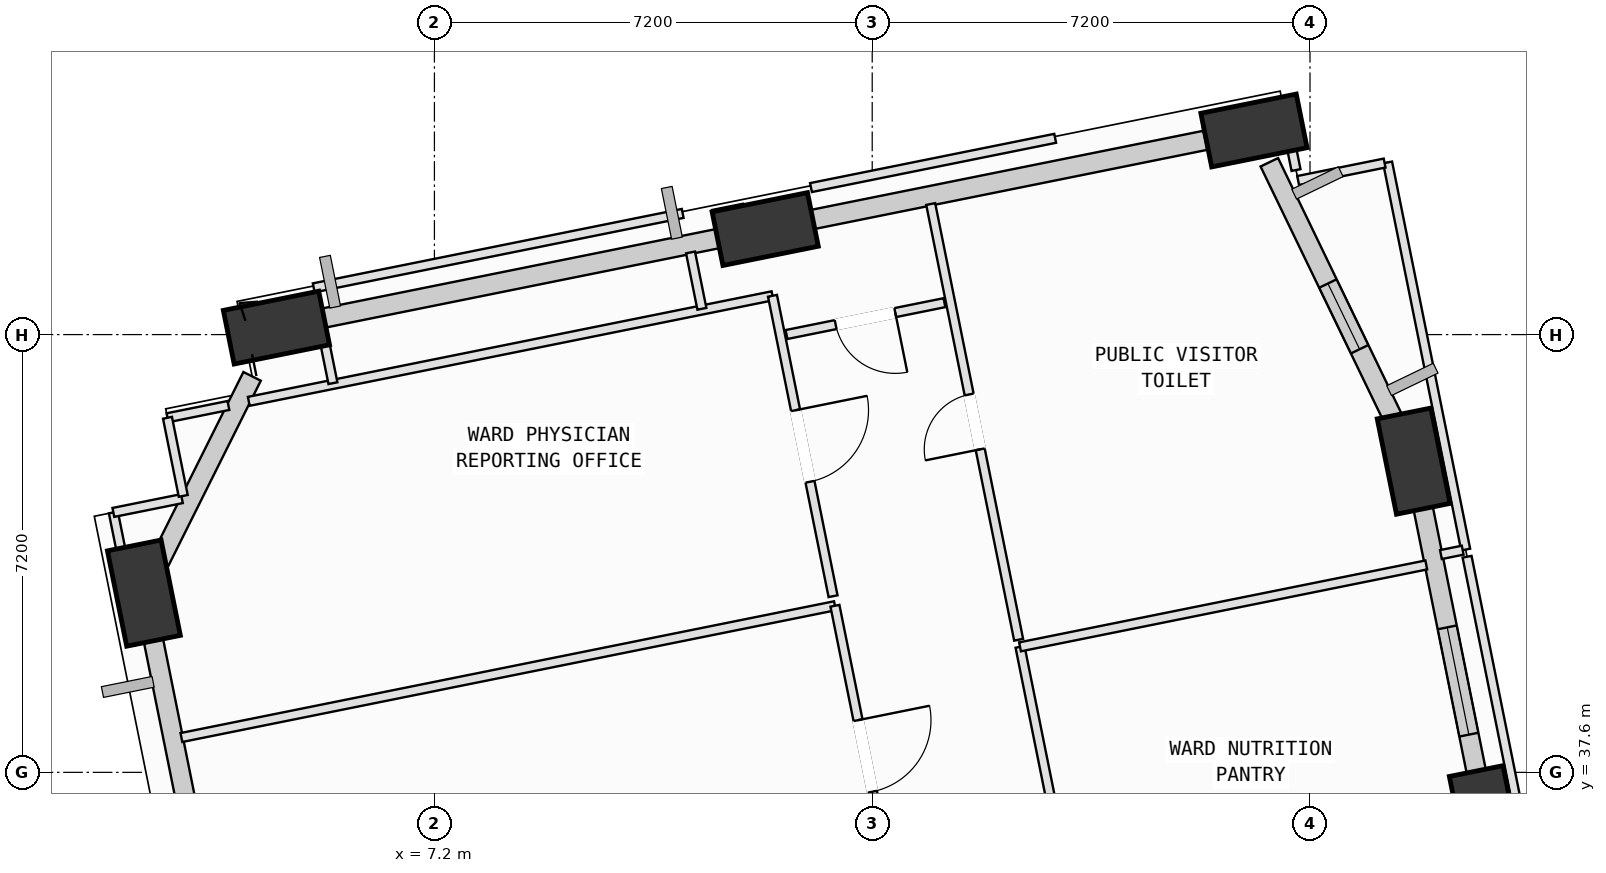
"""IFC4 building model, lengths in metres.
Left out: names, types, materials, properties, quantities, classifications, styles, units other than length and angle.
Written with IfcOpenShell. Run it as: python <this file> out.ifc"""

import sys

from ifc_helpers import new_model, si_unit, direction, frame, frame_2d, origin, origin_2d, place, context, subcontext, project, spatial, rectangle, extrude, element, fill, save


model = new_model("IFC4")
c1 = context("Model", 3, precision=1e-05, world=origin(), true_north=direction((0.0, 1.0)))
c2 = subcontext(c1, "Body", "Model", "MODEL_VIEW")
j1 = project(units=[si_unit("LENGTHUNIT", "METRE"), si_unit("PLANEANGLEUNIT", "RADIAN")], contexts=[c1])
p1 = place(None, origin())
s1 = spatial("IfcSite", under=j1, at=p1, CompositionType="ELEMENT")
p2 = place(p1, origin())
s2 = spatial("IfcBuilding", under=s1, at=p2, CompositionType="ELEMENT")
p3 = place(p2, frame((0.0, 0.0, 71.0)))
s3 = spatial("IfcBuildingStorey", under=s2, at=p3, CompositionType="ELEMENT", Elevation=71.0)
p4 = place(p3, frame((24.491, 36.837, 0.002), z_axis=(-0.04944522251, -0.038105134487, 0.998049682479), x_axis=(0.654284243965, 0.753768890214, 0.061193040821)))
e1 = element("IfcColumn", 1, at=p4, inside=s3, PredefinedType="COLUMN", context=c2, shape_type="SweptSolid", body=[
    extrude(rectangle(XDim=1.6, YDim=0.9, at=origin_2d()), origin(), (0.0, 0.0, 1.0), 4.004),
])
p5 = place(p3, frame((23.305, 42.719, 0.002), z_axis=(-0.07364612951, -0.043092115449, 0.996353008323), x_axis=(0.743170140005, 0.663853828041, 0.083643517389)))
e2 = element("IfcColumn", 2, at=p5, inside=s3, PredefinedType="COLUMN", context=c2, shape_type="SweptSolid", body=[
    extrude(rectangle(XDim=1.6, YDim=0.9, at=origin_2d()), origin(), (0.0, 0.0, 1.0), 4.011),
])
p6 = place(p3, frame((20.678, 48.157, 0.002), z_axis=(-0.095750725554, -0.054038139343, 0.993937461842), x_axis=(0.652889004976, -0.75714178031, 0.021731812851)))
e3 = element("IfcColumn", 3, at=p6, inside=s3, PredefinedType="COLUMN", context=c2, shape_type="SweptSolid", body=[
    extrude(rectangle(XDim=1.6, YDim=0.9, at=origin_2d()), origin(), (0.0, 0.0, 1.0), 4.021),
])
p7 = place(p3, frame((12.64, 46.536, 0.002), z_axis=(-0.088678638847, -0.086981440017, 0.992255172879), x_axis=(0.826442975623, -0.562484839864, 0.024552249733)))
e4 = element("IfcColumn", 4, at=p7, inside=s3, PredefinedType="COLUMN", context=c2, shape_type="SweptSolid", body=[
    extrude(rectangle(XDim=1.6, YDim=0.9, at=origin_2d()), origin(), (0.0, 0.0, 1.0), 4.028),
])
p8 = place(p3, frame((4.602, 44.915, 0.002), z_axis=(-0.081478721698, -0.119618983858, 0.989470826559), x_axis=(0.92027968951, -0.390213925825, 0.028607432025)))
e5 = element("IfcColumn", 5, at=p8, inside=s3, PredefinedType="COLUMN", context=c2, shape_type="SweptSolid", body=[
    extrude(rectangle(XDim=1.6, YDim=0.9, at=origin_2d()), origin(), (0.0, 0.0, 1.0), 4.039),
])
p9 = place(p3, frame((2.422, 40.548, 0.002), z_axis=(-0.063540455362, -0.128410967829, 0.989683400828), x_axis=(0.253106021414, 0.957189910208, 0.140445070115)))
e6 = element("IfcColumn", 6, at=p9, inside=s3, PredefinedType="COLUMN", context=c2, shape_type="SweptSolid", body=[
    extrude(rectangle(XDim=1.6, YDim=0.9, at=origin_2d()), origin(), (0.0, 0.0, 1.0), 4.038),
])
p10 = place(p3, frame((24.384, 37.368, 0.0), z_axis=(0.0, 0.0, 1.0), x_axis=(-0.197636570542, 0.980275362327, 0.0)))
e7 = element("IfcWall", 7, at=p10, inside=s3, PredefinedType="SOLIDWALL", context=c2, shape_type="SweptSolid", body=[
    extrude(rectangle(XDim=4.816, YDim=0.32, at=frame_2d((2.408, 0.0))), origin(), (0.0, 0.0, 1.0), 3.165),
])
p11 = place(p10, frame((0.869, 0.0, 0.75)))
e8 = element("IfcOpeningElement", 8, at=p11, cuts=e7, PredefinedType="OPENING", context=c2, shape_type="SweptSolid", body=[
    extrude(rectangle(XDim=1.8, YDim=2.05, at=frame_2d((0.9, 1.025))), frame((0.0, 0.17, 0.0), z_axis=(0.0, -1.0, 0.0), x_axis=(1.0, 0.0, 0.0)), (0.0, 0.0, 1.0), 0.34),
])
p12 = place(p3, frame((20.931, 47.634, 0.0), z_axis=(0.0, 0.0, 1.0), x_axis=(0.434947356849, -0.900455882745, 0.0)))
e9 = element("IfcWall", 9, at=p12, inside=s3, PredefinedType="SOLIDWALL", context=c2, shape_type="SweptSolid", body=[
    extrude(rectangle(XDim=4.889, YDim=0.32, at=frame_2d((2.444, 0.0))), origin(), (0.0, 0.0, 1.0), 3.165),
])
p13 = place(p12, frame((2.215, 0.0, 0.75)))
e10 = element("IfcOpeningElement", 10, at=p13, cuts=e9, PredefinedType="OPENING", context=c2, shape_type="SweptSolid", body=[
    extrude(rectangle(XDim=1.2, YDim=1.75, at=frame_2d((0.6, 0.875))), frame((0.0, 0.17, 0.0), z_axis=(0.0, -1.0, 0.0), x_axis=(1.0, 0.0, 0.0)), (0.0, 0.0, 1.0), 0.34),
])
p14 = place(p3, frame((13.015, 46.612, 0.0), z_axis=(0.0, 0.0, 1.0), x_axis=(0.98026972201, 0.197664544393, 0.0)))
e11 = element("IfcWall", 11, at=p14, inside=s3, PredefinedType="SOLIDWALL", context=c2, shape_type="SweptSolid", body=[
    extrude(rectangle(XDim=7.003, YDim=0.32, at=frame_2d((3.501, 0.0))), origin(), (0.0, 0.0, 1.0), 3.165),
])
p15 = place(p3, frame((4.958, 44.987, 0.0), z_axis=(0.0, 0.0, 1.0), x_axis=(0.980272459047, 0.197650970234, 0.0)))
e12 = element("IfcWall", 12, at=p15, inside=s3, PredefinedType="SOLIDWALL", context=c2, shape_type="SweptSolid", body=[
    extrude(rectangle(XDim=7.034, YDim=0.32, at=frame_2d((3.517, 0.0))), origin(), (0.0, 0.0, 1.0), 3.165),
])
p16 = place(p3, frame((2.564, 40.833, 0.0), z_axis=(0.0, 0.0, 1.0), x_axis=(0.446654108226, 0.894706715972, 0.0)))
e13 = element("IfcWall", 13, at=p16, inside=s3, PredefinedType="SOLIDWALL", context=c2, shape_type="SweptSolid", body=[
    extrude(rectangle(XDim=3.666, YDim=0.32, at=frame_2d((1.833, 0.0))), origin(), (0.0, 0.0, 1.0), 3.165),
])
p17 = place(p3, frame((3.615, 34.634, 0.0), z_axis=(0.0, 0.0, 1.0), x_axis=(-0.197635090988, 0.980275660623, 0.0)))
e14 = element("IfcWall", 14, at=p17, inside=s3, PredefinedType="SOLIDWALL", context=c2, shape_type="SweptSolid", body=[
    extrude(rectangle(XDim=5.223, YDim=0.32, at=frame_2d((2.611, 0.0))), origin(), (0.0, 0.0, 1.0), 3.165),
])
p18 = place(p17, frame((0.79, 0.0, 0.75)))
e15 = element("IfcOpeningElement", 15, at=p18, cuts=e14, PredefinedType="OPENING", context=c2, shape_type="SweptSolid", body=[
    extrude(rectangle(XDim=1.8, YDim=2.05, at=frame_2d((0.9, 1.025))), frame((0.0, 0.17, 0.0), z_axis=(0.0, -1.0, 0.0), x_axis=(1.0, 0.0, 0.0)), (0.0, 0.0, 1.0), 0.34),
])
p19 = place(p3, frame((3.039, 38.173, 0.0), z_axis=(0.0, 0.0, 1.0), x_axis=(0.980274606561, 0.197640319095, 0.0)))
e16 = element("IfcWall", 16, at=p19, inside=s3, PredefinedType="PARTITIONING", context=c2, shape_type="SweptSolid", body=[
    extrude(rectangle(XDim=10.964, YDim=0.15, at=frame_2d((5.482, 0.0))), origin(), (0.0, 0.0, 1.0), 3.78),
])
p20 = place(p3, frame((13.787, 40.34, 0.0), z_axis=(0.0, 0.0, 1.0), x_axis=(0.19779272105, -0.980243867361, 0.0)))
e17 = element("IfcWall", 17, at=p20, inside=s3, PredefinedType="PARTITIONING", context=c2, shape_type="SweptSolid", body=[
    extrude(rectangle(XDim=5.04, YDim=0.15, at=frame_2d((2.52, 0.0))), origin(), (0.0, 0.0, 1.0), 3.78),
])
p21 = place(p20, frame((1.92, 0.0, 0.0)))
e18 = element("IfcOpeningElement", 18, at=p21, cuts=e17, PredefinedType="OPENING", context=c2, shape_type="SweptSolid", body=[
    extrude(rectangle(XDim=1.2, YDim=2.15, at=frame_2d((0.6, 1.075))), frame((0.0, 0.085, 0.0), z_axis=(0.0, -1.0, 0.0), x_axis=(1.0, 0.0, 0.0)), (0.0, 0.0, 1.0), 0.17),
])
p22 = place(p3, frame((2.81, 43.432, 0.0), z_axis=(0.0, 0.0, 1.0), x_axis=(0.980248563295, 0.19776944698, 0.0)))
e19 = element("IfcWall", 19, at=p22, inside=s3, PredefinedType="PARTITIONING", context=c2, shape_type="SweptSolid", body=[
    extrude(rectangle(XDim=1.022, YDim=0.15, at=frame_2d((0.511, 0.0))), origin(), (0.0, 0.0, 1.0), 3.78),
])
p23 = place(p3, frame((4.147, 43.702, 0.0), z_axis=(0.0, 0.0, 1.0), x_axis=(0.980284600803, 0.197590742263, 0.0)))
e20 = element("IfcWall", 20, at=p23, inside=s3, PredefinedType="PARTITIONING", context=c2, shape_type="SweptSolid", body=[
    extrude(rectangle(XDim=8.786, YDim=0.15, at=frame_2d((4.393, 0.0))), origin(), (0.0, 0.0, 1.0), 3.78),
])
p24 = place(p3, frame((12.76, 45.438, 0.0), z_axis=(0.0, 0.0, 1.0), x_axis=(0.197624916703, -0.980277711824, 0.0)))
e21 = element("IfcWall", 21, at=p24, inside=s3, PredefinedType="PARTITIONING", context=c2, shape_type="SweptSolid", body=[
    extrude(rectangle(XDim=5.04, YDim=0.15, at=frame_2d((2.52, 0.0))), origin(), (0.0, 0.0, 1.0), 2.865),
])
p25 = place(p24, frame((1.92, 0.0, 0.0)))
e22 = element("IfcOpeningElement", 22, at=p25, cuts=e21, PredefinedType="OPENING", context=c2, shape_type="SweptSolid", body=[
    extrude(rectangle(XDim=1.2, YDim=2.15, at=frame_2d((0.6, 1.075))), frame((0.0, 0.085, 0.0), z_axis=(0.0, -1.0, 0.0), x_axis=(1.0, 0.0, 0.0)), (0.0, 0.0, 1.0), 0.17),
])
p26 = place(p3, frame((2.357, 39.708, 0.0), z_axis=(0.0, 0.0, 1.0), x_axis=(-0.197687528827, 0.980265087079, 0.0)))
e23 = element("IfcWall", 23, at=p26, inside=s3, PredefinedType="PARTITIONING", context=c2, shape_type="SweptSolid", body=[
    extrude(rectangle(XDim=2.211, YDim=0.15, at=frame_2d((1.105, 0.0))), origin(), (0.0, 0.0, 1.0), 3.165),
])
p27 = place(p3, frame((1.92, 41.875, 0.0), z_axis=(0.0, 0.0, 1.0), x_axis=(0.980310258895, 0.197463404976, 0.0)))
e24 = element("IfcWall", 24, at=p27, inside=s3, PredefinedType="PARTITIONING", context=c2, shape_type="SweptSolid", body=[
    extrude(rectangle(XDim=1.15, YDim=0.15, at=frame_2d((0.575, 0.0))), origin(), (0.0, 0.0, 1.0), 3.78),
])
p28 = place(p3, frame((3.069, 42.147, 0.0), z_axis=(0.0, 0.0, 1.0), x_axis=(-0.197620300153, 0.980278642513, 0.0)))
e25 = element("IfcWall", 25, at=p28, inside=s3, PredefinedType="PARTITIONING", context=c2, shape_type="SweptSolid", body=[
    extrude(rectangle(XDim=1.311, YDim=0.15, at=frame_2d((0.655, 0.0))), origin(), (0.0, 0.0, 1.0), 3.78),
])
p29 = place(p3, frame((18.387, 31.949, 0.0), z_axis=(0.0, 0.0, 1.0), x_axis=(-0.197690746024, 0.98026443827, 0.0)))
e26 = element("IfcWall", 26, at=p29, inside=s3, PredefinedType="PARTITIONING", context=c2, shape_type="SweptSolid", body=[
    extrude(rectangle(XDim=7.87, YDim=0.15, at=frame_2d((3.935, 0.0))), origin(), (0.0, 0.0, 1.0), 3.78),
])
p30 = place(p29, frame((3.475, 0.0, 0.0)))
e27 = element("IfcOpeningElement", 27, at=p30, cuts=e26, PredefinedType="OPENING", context=c2, shape_type="SweptSolid", body=[
    extrude(rectangle(XDim=0.92, YDim=2.1, at=frame_2d((0.46, 1.05))), frame((0.0, 0.085, 0.0), z_axis=(0.0, -1.0, 0.0), x_axis=(1.0, 0.0, 0.0)), (0.0, 0.0, 1.0), 0.17),
])
p31 = place(p3, frame((16.831, 39.664, 0.0), z_axis=(0.0, 0.0, 1.0), x_axis=(0.980276392981, 0.197631458435, 0.0)))
e28 = element("IfcWall", 28, at=p31, inside=s3, PredefinedType="PARTITIONING", context=c2, shape_type="SweptSolid", body=[
    extrude(rectangle(XDim=6.815, YDim=0.15, at=frame_2d((3.408, 0.0))), origin(), (0.0, 0.0, 1.0), 3.78),
])
p32 = place(p3, frame((24.183, 41.146, 0.0), z_axis=(0.0, 0.0, 1.0), x_axis=(0.197690746024, -0.98026443827, 0.0)))
e29 = element("IfcWall", 29, at=p32, inside=s3, PredefinedType="PARTITIONING", context=c2, shape_type="SweptSolid", body=[
    extrude(rectangle(XDim=7.87, YDim=0.15, at=frame_2d((3.935, 0.0))), origin(), (0.0, 0.0, 1.0), 3.78),
])
p33 = place(p3, frame((22.876, 47.631, 0.0), z_axis=(0.0, 0.0, 1.0), x_axis=(0.197669966199, -0.980268628725, 0.0)))
e30 = element("IfcWall", 30, at=p33, inside=s3, PredefinedType="PARTITIONING", context=c2, shape_type="SweptSolid", body=[
    extrude(rectangle(XDim=6.495, YDim=0.15, at=frame_2d((3.248, 0.0))), origin(), (0.0, 0.0, 1.0), 3.78),
])
p34 = place(p3, frame((24.111, 41.254, 0.0), z_axis=(0.0, 0.0, 1.0), x_axis=(-0.980374510456, -0.197144158544, 0.0)))
e31 = element("IfcWall", 31, at=p34, inside=s3, PredefinedType="PARTITIONING", context=c2, shape_type="SweptSolid", body=[
    extrude(rectangle(XDim=0.365, YDim=0.15, at=frame_2d((0.183, 0.0))), origin(), (0.0, 0.0, 1.0), 3.78),
])
p35 = place(p3, frame((16.808, 39.781, 0.0), z_axis=(0.0, 0.0, 1.0), x_axis=(-0.197804914587, 0.980241406882, 0.0)))
e32 = element("IfcWall", 32, at=p35, inside=s3, PredefinedType="PARTITIONING", context=c2, shape_type="SweptSolid", body=[
    extrude(rectangle(XDim=7.311, YDim=0.15, at=frame_2d((3.655, 0.0))), origin(), (0.0, 0.0, 1.0), 3.78),
])
p36 = place(p35, frame((3.195, 0.0, 0.0)))
e33 = element("IfcOpeningElement", 33, at=p36, cuts=e32, PredefinedType="OPENING", context=c2, shape_type="SweptSolid", body=[
    extrude(rectangle(XDim=0.92, YDim=2.1, at=frame_2d((0.46, 1.05))), frame((0.0, 0.085, 0.0), z_axis=(0.0, -1.0, 0.0), x_axis=(1.0, 0.0, 0.0)), (0.0, 0.0, 1.0), 0.17),
])
p37 = place(p3, frame((19.842, 48.182, 0.0), z_axis=(0.0, 0.0, 1.0), x_axis=(0.980235176833, 0.197835785689, 0.0)))
e34 = element("IfcWall", 34, at=p37, inside=s3, PredefinedType="PARTITIONING", context=c2, shape_type="SweptSolid", body=[
    extrude(rectangle(XDim=1.365, YDim=0.15, at=frame_2d((0.682, 0.0))), origin(), (0.0, 0.0, 1.0), 3.165),
])
p38 = place(p3, frame((21.19, 48.403, 0.0), z_axis=(0.0, 0.0, 1.0), x_axis=(0.196937151026, -0.980416114997, 0.0)))
e35 = element("IfcWall", 35, at=p38, inside=s3, PredefinedType="PARTITIONING", context=c2, shape_type="SweptSolid", body=[
    extrude(rectangle(XDim=0.915, YDim=0.15, at=frame_2d((0.458, 0.0))), origin(), (0.0, 0.0, 1.0), 3.78),
])
p39 = place(p3, frame((21.405, 47.334, 0.0), z_axis=(0.0, 0.0, 1.0), x_axis=(0.980216494426, 0.197928330605, 0.0)))
e36 = element("IfcWall", 36, at=p39, inside=s3, PredefinedType="PARTITIONING", context=c2, shape_type="SweptSolid", body=[
    extrude(rectangle(XDim=1.451, YDim=0.15, at=frame_2d((0.725, 0.0))), origin(), (0.0, 0.0, 1.0), 3.78),
])
p40 = place(p3, frame((5.215, 45.569, 0.0), z_axis=(0.0, 0.0, 1.0), x_axis=(0.980259293223, 0.197716256414, 0.0)))
e37 = element("IfcWall", 37, at=p40, inside=s3, PredefinedType="PARTITIONING", context=c2, shape_type="SweptSolid", body=[
    extrude(rectangle(XDim=6.19, YDim=0.15, at=frame_2d((3.095, 0.0))), origin(), (0.0, 0.0, 1.0), 3.78),
])
p41 = place(p3, frame((11.412, 46.151, 0.0), z_axis=(0.0, 0.0, 1.0), x_axis=(0.197804272123, -0.980241536526, 0.0)))
e38 = element("IfcWall", 38, at=p41, inside=s3, PredefinedType="PARTITIONING", context=c2, shape_type="SweptSolid", body=[
    extrude(rectangle(XDim=0.946, YDim=0.15, at=frame_2d((0.473, 0.0))), origin(), (0.0, 0.0, 1.0), 3.78),
])
p42 = place(p3, frame((5.531, 44.001, 0.0), z_axis=(0.0, 0.0, 1.0), x_axis=(-0.197954593282, 0.980211191019, 0.0)))
e39 = element("IfcWall", 39, at=p42, inside=s3, PredefinedType="PARTITIONING", context=c2, shape_type="SweptSolid", body=[
    extrude(rectangle(XDim=0.945, YDim=0.15, at=frame_2d((0.472, 0.0))), origin(), (0.0, 0.0, 1.0), 3.78),
])
p43 = place(p3, frame((15.588, 45.325, 0.0), z_axis=(0.0, 0.0, 1.0), x_axis=(-0.980264069373, -0.197692575216, 0.0)))
e40 = element("IfcWall", 40, at=p43, inside=s3, PredefinedType="PARTITIONING", context=c2, shape_type="SweptSolid", body=[
    extrude(rectangle(XDim=2.65, YDim=0.15, at=frame_2d((1.325, 0.0))), origin(), (0.0, 0.0, 1.0), 3.78),
])
p44 = place(p43, frame((0.825, 0.0, 0.0)))
e41 = element("IfcOpeningElement", 41, at=p44, cuts=e40, PredefinedType="OPENING", context=c2, shape_type="SweptSolid", body=[
    extrude(rectangle(XDim=1.0, YDim=2.12, at=frame_2d((0.5, 1.06))), frame((0.0, 0.085, 0.0), z_axis=(0.0, -1.0, 0.0), x_axis=(1.0, 0.0, 0.0)), (0.0, 0.0, 1.0), 0.17),
])
p45 = place(p3, frame((13.393, 47.218, 0.0), z_axis=(0.0, 0.0, 1.0), x_axis=(0.980256163241, 0.197731773946, 0.0)))
e42 = element("IfcWall", 42, at=p45, inside=s3, PredefinedType="PARTITIONING", context=c2, shape_type="SweptSolid", body=[
    extrude(rectangle(XDim=4.097, YDim=0.15, at=frame_2d((2.048, 0.0))), origin(), (0.0, 0.0, 1.0), 3.78),
])
p46 = place(p11, origin())
e43 = element("IfcWindow", 43, at=p46, inside=s3, PartitioningType="SINGLE_PANEL", PredefinedType="WINDOW", context=c2, shape_type="SweptSolid", body=[
    extrude(rectangle(XDim=1.8, YDim=2.05, at=frame_2d((0.9, 1.025))), frame((0.0, 0.03, 0.0), z_axis=(0.0, -1.0, 0.0), x_axis=(1.0, 0.0, 0.0)), (0.0, 0.0, 1.0), 0.06),
])
fill(e8, e43)
p47 = place(p13, origin())
e44 = element("IfcWindow", 44, at=p47, inside=s3, PartitioningType="SINGLE_PANEL", PredefinedType="WINDOW", context=c2, shape_type="SweptSolid", body=[
    extrude(rectangle(XDim=1.2, YDim=1.75, at=frame_2d((0.6, 0.875))), frame((0.0, 0.03, 0.0), z_axis=(0.0, -1.0, 0.0), x_axis=(1.0, 0.0, 0.0)), (0.0, 0.0, 1.0), 0.06),
])
fill(e10, e44)
p48 = place(p21, origin())
e45 = element("IfcDoor", 45, at=p48, inside=s3, OperationType="SINGLE_SWING_LEFT", PredefinedType="DOOR", context=c2, shape_type="SweptSolid", body=[
    extrude(rectangle(XDim=1.2, YDim=2.15, at=frame_2d((0.6, 1.075))), frame((0.0, 0.025, 0.0), z_axis=(0.0, -1.0, 0.0), x_axis=(1.0, 0.0, 0.0)), (0.0, 0.0, 1.0), 0.05),
])
fill(e18, e45)
p49 = place(p25, origin())
e46 = element("IfcDoor", 46, at=p49, inside=s3, OperationType="SINGLE_SWING_LEFT", PredefinedType="DOOR", context=c2, shape_type="SweptSolid", body=[
    extrude(rectangle(XDim=1.2, YDim=2.15, at=frame_2d((0.6, 1.075))), frame((0.0, 0.025, 0.0), z_axis=(0.0, -1.0, 0.0), x_axis=(1.0, 0.0, 0.0)), (0.0, 0.0, 1.0), 0.05),
])
fill(e22, e46)
p50 = place(p36, origin())
e47 = element("IfcDoor", 47, at=p50, inside=s3, OperationType="SINGLE_SWING_LEFT", PredefinedType="DOOR", context=c2, shape_type="SweptSolid", body=[
    extrude(rectangle(XDim=0.92, YDim=2.1, at=frame_2d((0.46, 1.05))), frame((0.0, 0.025, 0.0), z_axis=(0.0, -1.0, 0.0), x_axis=(1.0, 0.0, 0.0)), (0.0, 0.0, 1.0), 0.05),
])
fill(e33, e47)
p51 = place(p44, origin())
e48 = element("IfcDoor", 48, at=p51, inside=s3, OperationType="SINGLE_SWING_LEFT", PredefinedType="DOOR", context=c2, shape_type="SweptSolid", body=[
    extrude(rectangle(XDim=1.0, YDim=2.12, at=frame_2d((0.5, 1.06))), frame((0.0, 0.025, 0.0), z_axis=(0.0, -1.0, 0.0), x_axis=(1.0, 0.0, 0.0)), (0.0, 0.0, 1.0), 0.05),
])
fill(e41, e48)
save(model, sys.argv[1])
